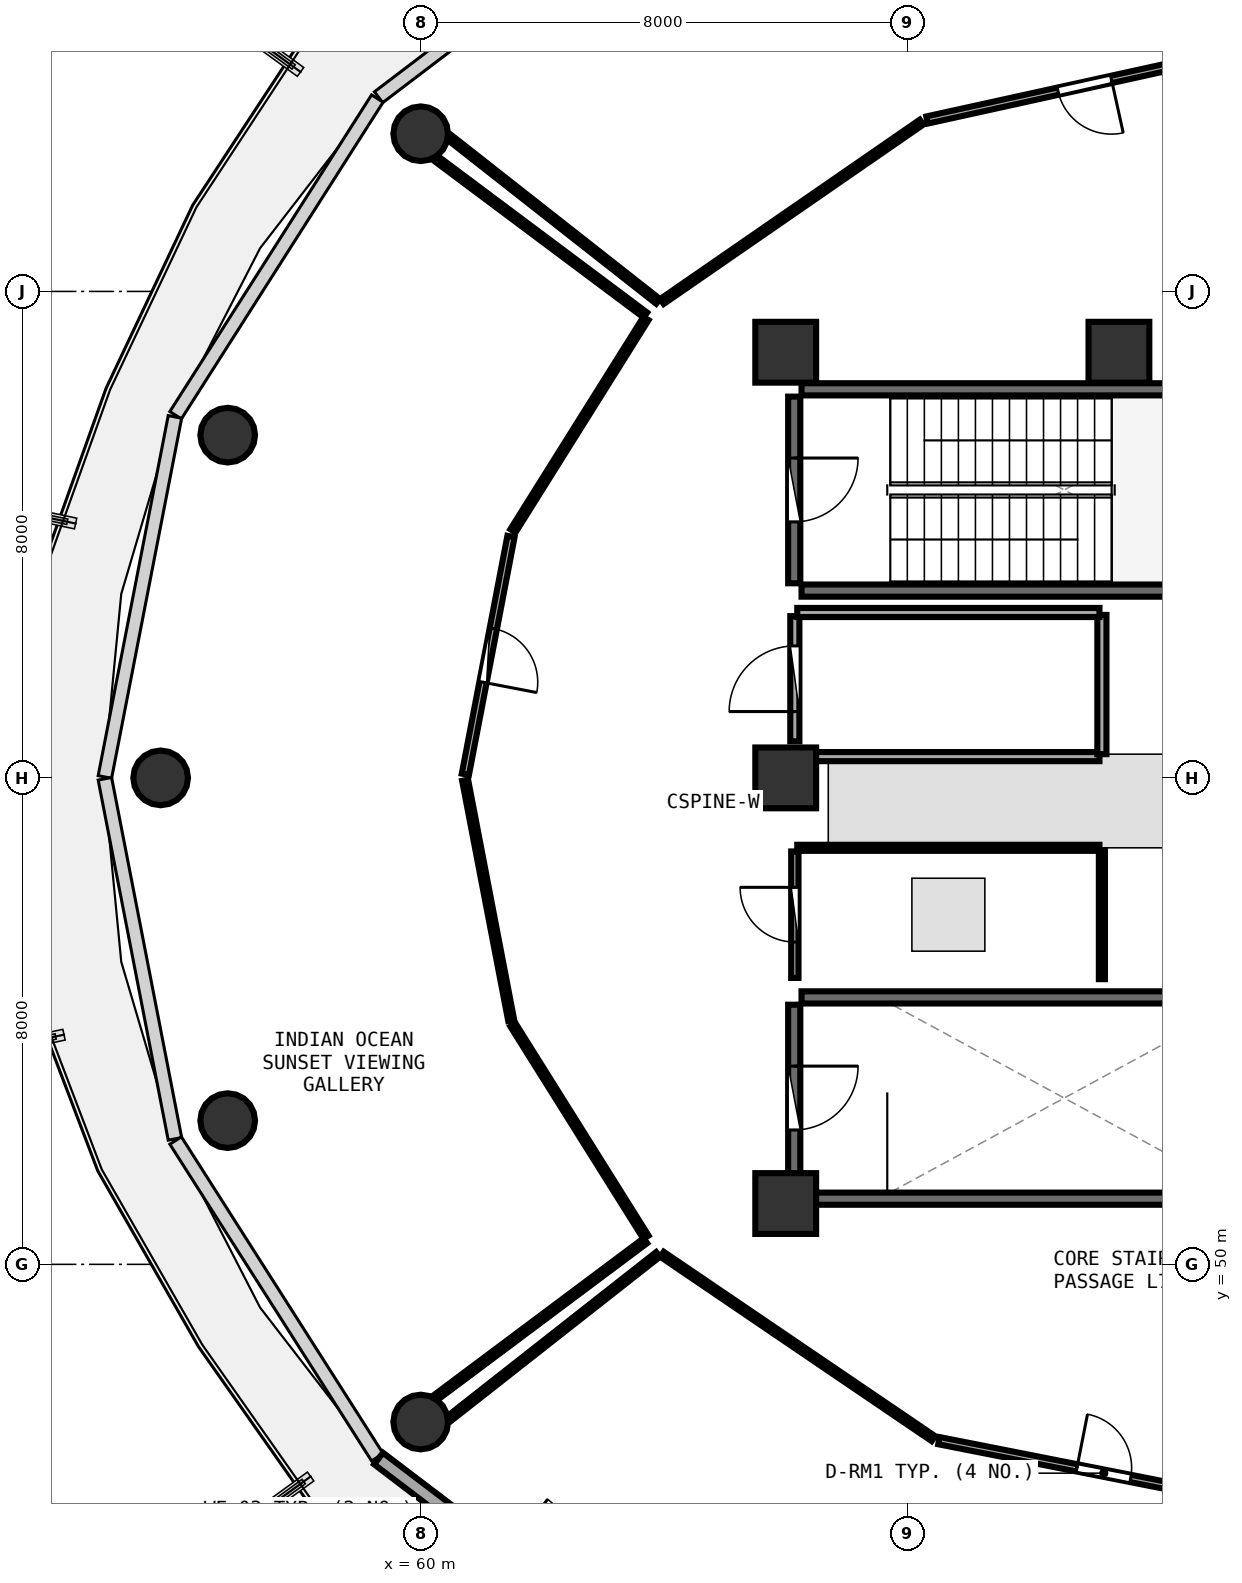
"""IFC4 building model, lengths in metres.
Left out: names, types, materials, properties, quantities, classifications, styles, units other than length and angle.
Written with IfcOpenShell. Run it as: python <this file> out.ifc"""

import sys

from ifc_helpers import new_model, si_unit, direction, frame, frame_2d, origin, origin_2d, place, context, subcontext, project, spatial, rectangle, circle, extrude, element, fill, save


model = new_model("IFC4")
c1 = context("Model", 3, precision=1e-05, world=origin(), true_north=direction((0.0, 1.0)))
c2 = subcontext(c1, "Body", "Model", "MODEL_VIEW")
j1 = project(units=[si_unit("LENGTHUNIT", "METRE"), si_unit("PLANEANGLEUNIT", "RADIAN")], contexts=[c1])
p1 = place(None, origin())
s1 = spatial("IfcSite", under=j1, at=p1, CompositionType="ELEMENT")
p2 = place(p1, origin())
s2 = spatial("IfcBuilding", under=s1, at=p2, CompositionType="ELEMENT")
p3 = place(p2, frame((0.0, 0.0, 293.7)))
s3 = spatial("IfcBuildingStorey", under=s2, at=p3, CompositionType="ELEMENT", Elevation=293.7)
for number, where, z_axis, x_axis in (
    (1, (66.0, 51.0, 0.0), (0.0, 0.0, 1.0), (1.0, 0.0, 0.0)),
    (2, (71.48, 65.0, 0.0), (0.0, 0.0, 1.0), (1.0, 0.0, 0.0)),
    (3, (66.0, 65.0, 0.0), (0.0, 0.0, 1.0), (1.0, 0.0, 0.0)),
    (4, (66.0, 58.0, 0.0), (0.0, 0.0, 1.0), (1.0, 0.0, 0.0)),
):
    element("IfcColumn", number, at=place(p3, frame(where, z_axis=z_axis, x_axis=x_axis)), inside=s3, PredefinedType="PILASTER", context=c2, shape_type="SweptSolid", body=[
        extrude(rectangle(XDim=1.0, YDim=1.0, at=origin_2d()), origin(), (0.0, 0.0, 1.0), 4.8),
    ])
for number, where, z_axis, x_axis in (
    (5, (59.997, 68.593, 0.0), (0.0, 0.0, 1.0), (1.0, 0.0, 0.0)),
    (6, (56.823, 63.636, 0.0), (0.0, 0.0, 1.0), (1.0, 0.0, 0.0)),
    (7, (55.72, 58.0, 0.0), (0.0, 0.0, 1.0), (1.0, 0.0, 0.0)),
    (8, (56.823, 52.364, 0.0), (0.0, 0.0, 1.0), (1.0, 0.0, 0.0)),
    (9, (59.997, 47.407, 0.0), (0.0, 0.0, 1.0), (1.0, 0.0, 0.0)),
):
    element("IfcColumn", number, at=place(p3, frame(where, z_axis=z_axis, x_axis=x_axis)), inside=s3, PredefinedType="COLUMN", context=c2, shape_type="SweptSolid", body=[
        extrude(circle(Radius=0.45, at=origin_2d()), origin(), (0.0, 0.0, 1.0), 4.8),
    ])
p4 = place(p3, frame((59.304, 46.806, 0.0), z_axis=(0.0, 0.0, 1.0), x_axis=(0.796010444211, -0.605282886514, 0.0)))
e10 = element("IfcWall", 10, at=p4, inside=s3, PredefinedType="SOLIDWALL", context=c2, shape_type="SweptSolid", body=[
    extrude(rectangle(XDim=6.387, YDim=0.24, at=frame_2d((3.194, 0.0))), origin(), (0.0, 0.0, 1.0), 4.525),
])
p5 = place(p4, frame((2.619, 0.0, 0.0)))
e11 = element("IfcOpeningElement", 11, at=p5, cuts=e10, PredefinedType="OPENING", context=c2, shape_type="SweptSolid", body=[
    extrude(rectangle(XDim=1.15, YDim=2.15, at=frame_2d((0.575, 1.075))), frame((0.0, 0.13, 0.0), z_axis=(0.0, -1.0, 0.0), x_axis=(1.0, 0.0, 0.0)), (0.0, 0.0, 1.0), 0.26),
])
for number, where, z_axis, x_axis in (
    (12, (66.26, 61.08, 0.0), (0.0, 0.0, 1.0), (1.0, 0.0, 0.0)),
    (13, (73.42, 64.39, 0.0), (0.0, 0.0, 1.0), (-1.0, 0.0, 0.0)),
):
    element("IfcWall", number, at=place(p3, frame(where, z_axis=z_axis, x_axis=x_axis)), inside=s3, PredefinedType="SHEAR", context=c2, shape_type="SweptSolid", body=[
        extrude(rectangle(XDim=7.16, YDim=0.2, at=frame_2d((3.58, 0.0))), origin(), (0.0, 0.0, 1.0), 4.54),
    ])
p6 = place(p3, frame((66.14, 64.27, 0.0), z_axis=(0.0, 0.0, 1.0), x_axis=(0.0, -1.0, 0.0)))
e14 = element("IfcWall", 14, at=p6, inside=s3, PredefinedType="SHEAR", context=c2, shape_type="SweptSolid", body=[
    extrude(rectangle(XDim=3.07, YDim=0.2, at=frame_2d((1.535, 0.0))), origin(), (0.0, 0.0, 1.0), 4.54),
])
p7 = place(p6, frame((1.01, 0.0, 0.0)))
e15 = element("IfcOpeningElement", 15, at=p7, cuts=e14, PredefinedType="OPENING", context=c2, shape_type="SweptSolid", body=[
    extrude(rectangle(XDim=1.05, YDim=2.1, at=frame_2d((0.525, 1.05))), frame((0.0, 0.11, 0.0), z_axis=(0.0, -1.0, 0.0), x_axis=(1.0, 0.0, 0.0)), (0.0, 0.0, 1.0), 0.22),
])
for number, where, z_axis, x_axis in (
    (16, (66.26, 51.08, 0.0), (0.0, 0.0, 1.0), (1.0, 0.0, 0.0)),
    (17, (73.42, 54.39, 0.0), (0.0, 0.0, 1.0), (-1.0, 0.0, 0.0)),
):
    element("IfcWall", number, at=place(p3, frame(where, z_axis=z_axis, x_axis=x_axis)), inside=s3, PredefinedType="SHEAR", context=c2, shape_type="SweptSolid", body=[
        extrude(rectangle(XDim=7.16, YDim=0.2, at=frame_2d((3.58, 0.0))), origin(), (0.0, 0.0, 1.0), 4.54),
    ])
p8 = place(p3, frame((66.14, 54.27, 0.0), z_axis=(0.0, 0.0, 1.0), x_axis=(0.0, -1.0, 0.0)))
e18 = element("IfcWall", 18, at=p8, inside=s3, PredefinedType="SHEAR", context=c2, shape_type="SweptSolid", body=[
    extrude(rectangle(XDim=3.07, YDim=0.2, at=frame_2d((1.535, 0.0))), origin(), (0.0, 0.0, 1.0), 4.54),
])
p9 = place(p8, frame((1.01, 0.0, 0.0)))
e19 = element("IfcOpeningElement", 19, at=p9, cuts=e18, PredefinedType="OPENING", context=c2, shape_type="SweptSolid", body=[
    extrude(rectangle(XDim=1.05, YDim=2.1, at=frame_2d((0.525, 1.05))), frame((0.0, 0.11, 0.0), z_axis=(0.0, -1.0, 0.0), x_axis=(1.0, 0.0, 0.0)), (0.0, 0.0, 1.0), 0.22),
])
p10 = place(p3, frame((66.15, 58.602, 0.0), z_axis=(0.0, 0.0, 1.0), x_axis=(0.0, 1.0, 0.0)))
e20 = element("IfcWall", 20, at=p10, inside=s3, PredefinedType="PARTITIONING", context=c2, shape_type="SweptSolid", body=[
    extrude(rectangle(XDim=2.058, YDim=0.15, at=frame_2d((1.029, 0.0))), origin(), (0.0, 0.0, 1.0), 3.825),
])
p11 = place(p10, frame((0.489, 0.0, 0.0)))
e21 = element("IfcOpeningElement", 21, at=p11, cuts=e20, PredefinedType="OPENING", context=c2, shape_type="SweptSolid", body=[
    extrude(rectangle(XDim=1.08, YDim=2.1, at=frame_2d((0.54, 1.05))), frame((0.0, 0.085, 0.0), z_axis=(0.0, -1.0, 0.0), x_axis=(1.0, 0.0, 0.0)), (0.0, 0.0, 1.0), 0.17),
])
p12 = place(p3, frame((66.15, 54.71, 0.0), z_axis=(0.0, 0.0, 1.0), x_axis=(0.0, 1.0, 0.0)))
e22 = element("IfcWall", 22, at=p12, inside=s3, PredefinedType="PARTITIONING", context=c2, shape_type="SweptSolid", body=[
    extrude(rectangle(XDim=2.08, YDim=0.12, at=frame_2d((1.04, 0.0))), origin(), (0.0, 0.0, 1.0), 3.825),
])
p13 = place(p12, frame((0.59, 0.0, 0.0)))
e23 = element("IfcOpeningElement", 23, at=p13, cuts=e22, PredefinedType="OPENING", context=c2, shape_type="SweptSolid", body=[
    extrude(rectangle(XDim=0.9, YDim=2.08, at=frame_2d((0.45, 1.04))), frame((0.0, 0.07, 0.0), z_axis=(0.0, -1.0, 0.0), x_axis=(1.0, 0.0, 0.0)), (0.0, 0.0, 1.0), 0.14),
])
p14 = place(p3, frame((73.51, 69.961, 0.0), z_axis=(0.0, 0.0, 1.0), x_axis=(-0.976586737222, -0.215124021631, 0.0)))
e24 = element("IfcWall", 24, at=p14, inside=s3, PredefinedType="PARTITIONING", context=c2, shape_type="SweptSolid", body=[
    extrude(rectangle(XDim=5.31, YDim=0.12, at=frame_2d((2.655, 0.0))), origin(), (0.0, 0.0, 1.0), 2.525),
])
p15 = place(p14, frame((2.205, 0.0, 0.0)))
e25 = element("IfcOpeningElement", 25, at=p15, cuts=e24, PredefinedType="OPENING", context=c2, shape_type="SweptSolid", body=[
    extrude(rectangle(XDim=0.9, YDim=2.08, at=frame_2d((0.45, 1.04))), frame((0.0, 0.07, 0.0), z_axis=(0.0, -1.0, 0.0), x_axis=(1.0, 0.0, 0.0)), (0.0, 0.0, 1.0), 0.14),
])
p16 = place(p3, frame((61.482, 61.97, 0.0), z_axis=(0.0, 0.0, 1.0), x_axis=(-0.18843585457, -0.982085499696, 0.0)))
e26 = element("IfcWall", 26, at=p16, inside=s3, PredefinedType="PARTITIONING", context=c2, shape_type="SweptSolid", body=[
    extrude(rectangle(XDim=3.983, YDim=0.12, at=frame_2d((1.991, 0.0))), origin(), (0.0, 0.0, 1.0), 2.525),
])
p17 = place(p16, frame((1.541, 0.0, 0.0)))
e27 = element("IfcOpeningElement", 27, at=p17, cuts=e26, PredefinedType="OPENING", context=c2, shape_type="SweptSolid", body=[
    extrude(rectangle(XDim=0.9, YDim=2.08, at=frame_2d((0.45, 1.04))), frame((0.0, 0.07, 0.0), z_axis=(0.0, -1.0, 0.0), x_axis=(1.0, 0.0, 0.0)), (0.0, 0.0, 1.0), 0.14),
])
p18 = place(p3, frame((68.52, 47.1, 0.0), z_axis=(0.0, 0.0, 1.0), x_axis=(0.981112332552, -0.193438855749, 0.0)))
e28 = element("IfcWall", 28, at=p18, inside=s3, PredefinedType="PARTITIONING", context=c2, shape_type="SweptSolid", body=[
    extrude(rectangle(XDim=5.525, YDim=0.12, at=frame_2d((2.763, 0.0))), origin(), (0.0, 0.0, 1.0), 2.525),
])
p19 = place(p18, frame((2.313, 0.0, 0.0)))
e29 = element("IfcOpeningElement", 29, at=p19, cuts=e28, PredefinedType="OPENING", context=c2, shape_type="SweptSolid", body=[
    extrude(rectangle(XDim=0.9, YDim=2.08, at=frame_2d((0.45, 1.04))), frame((0.0, 0.07, 0.0), z_axis=(0.0, -1.0, 0.0), x_axis=(1.0, 0.0, 0.0)), (0.0, 0.0, 1.0), 0.14),
])
p20 = place(p3, frame((66.391, 58.35, 0.0), z_axis=(0.0, 0.0, 1.0), x_axis=(1.0, 0.0, 0.0)))
e30 = element("IfcWall", 30, at=p20, inside=s3, PredefinedType="PARTITIONING", context=c2, shape_type="SweptSolid", body=[
    extrude(rectangle(XDim=4.769, YDim=0.15, at=frame_2d((2.384, 0.0))), origin(), (0.0, 0.0, 1.0), 4.53),
])
p21 = place(p3, frame((71.2, 58.39, 0.0), z_axis=(0.0, 0.0, 1.0), x_axis=(0.0, 1.0, 0.0)))
e31 = element("IfcWall", 31, at=p21, inside=s3, PredefinedType="PARTITIONING", context=c2, shape_type="SweptSolid", body=[
    extrude(rectangle(XDim=2.29, YDim=0.15, at=frame_2d((1.145, 0.0))), origin(), (0.0, 0.0, 1.0), 4.53),
])
p22 = place(p3, frame((71.16, 60.72, 0.0), z_axis=(0.0, 0.0, 1.0), x_axis=(-1.0, 0.0, 0.0)))
e32 = element("IfcWall", 32, at=p22, inside=s3, PredefinedType="PARTITIONING", context=c2, shape_type="SweptSolid", body=[
    extrude(rectangle(XDim=4.97, YDim=0.15, at=frame_2d((2.485, 0.0))), origin(), (0.0, 0.0, 1.0), 3.825),
])
p23 = place(p3, frame((71.2, 54.69, 0.0), z_axis=(0.0, 0.0, 1.0), x_axis=(0.0, 1.0, 0.0)))
e33 = element("IfcWall", 33, at=p23, inside=s3, PredefinedType="PARTITIONING", context=c2, shape_type="SweptSolid", body=[
    extrude(rectangle(XDim=2.12, YDim=0.1, at=frame_2d((1.06, 0.0))), origin(), (0.0, 0.0, 1.0), 4.53),
])
p24 = place(p3, frame((71.16, 56.85, 0.0), z_axis=(0.0, 0.0, 1.0), x_axis=(-1.0, 0.0, 0.0)))
e34 = element("IfcWall", 34, at=p24, inside=s3, PredefinedType="PARTITIONING", context=c2, shape_type="SweptSolid", body=[
    extrude(rectangle(XDim=4.97, YDim=0.1, at=frame_2d((2.485, 0.0))), origin(), (0.0, 0.0, 1.0), 3.825),
])
p25 = place(p3, frame((68.233, 68.783, 0.0), z_axis=(0.0, 0.0, 1.0), x_axis=(-0.822777954932, -0.568362944673, 0.0)))
e35 = element("IfcWall", 35, at=p25, inside=s3, PredefinedType="PARTITIONING", context=c2, shape_type="SweptSolid", body=[
    extrude(rectangle(XDim=5.188, YDim=0.1, at=frame_2d((2.594, 0.0))), origin(), (0.0, 0.0, 1.0), 2.525),
])
p26 = place(p3, frame((63.9, 65.837, 0.0), z_axis=(0.0, 0.0, 1.0), x_axis=(-0.786300871832, 0.617843782, 0.0)))
e36 = element("IfcWall", 36, at=p26, inside=s3, PredefinedType="PARTITIONING", context=c2, shape_type="SweptSolid", body=[
    extrude(rectangle(XDim=4.365, YDim=0.1, at=frame_2d((2.183, 0.0))), origin(), (0.0, 0.0, 1.0), 2.525),
])
p27 = place(p3, frame((63.702, 65.554, 0.0), z_axis=(0.0, 0.0, 1.0), x_axis=(-0.53099994336, -0.847371854708, 0.0)))
e37 = element("IfcWall", 37, at=p27, inside=s3, PredefinedType="PARTITIONING", context=c2, shape_type="SweptSolid", body=[
    extrude(rectangle(XDim=4.12, YDim=0.1, at=frame_2d((2.06, 0.0))), origin(), (0.0, 0.0, 1.0), 2.525),
])
p28 = place(p3, frame((60.728, 57.961, 0.0), z_axis=(0.0, 0.0, 1.0), x_axis=(0.188453433241, -0.982082126657, 0.0)))
e38 = element("IfcWall", 38, at=p28, inside=s3, PredefinedType="PARTITIONING", context=c2, shape_type="SweptSolid", body=[
    extrude(rectangle(XDim=4.022, YDim=0.1, at=frame_2d((2.011, 0.0))), origin(), (0.0, 0.0, 1.0), 2.525),
])
p29 = place(p3, frame((61.514, 53.937, 0.0), z_axis=(0.0, 0.0, 1.0), x_axis=(0.53099994336, -0.847371854708, 0.0)))
e39 = element("IfcWall", 39, at=p29, inside=s3, PredefinedType="PARTITIONING", context=c2, shape_type="SweptSolid", body=[
    extrude(rectangle(XDim=4.12, YDim=0.1, at=frame_2d((2.06, 0.0))), origin(), (0.0, 0.0, 1.0), 2.525),
])
for number, where, z_axis, x_axis in (
    (40, (63.691, 50.388, 0.0), (0.0, 0.0, 1.0), (-0.801, -0.599, 0.0)),
    (41, (60.245, 68.188, 0.0), (0.0, 0.0, 1.0), (0.801, -0.599, 0.0)),
):
    element("IfcWall", number, at=place(p3, frame(where, z_axis=z_axis, x_axis=x_axis)), inside=s3, PredefinedType="PARTITIONING", context=c2, shape_type="SweptSolid", body=[
        extrude(rectangle(XDim=4.302, YDim=0.1, at=frame_2d((2.151, 0.0))), origin(), (0.0, 0.0, 1.0), 2.525),
    ])
p30 = place(p3, frame((63.965, 50.166, 0.0), z_axis=(0.0, 0.0, 1.0), x_axis=(0.82725042388, -0.561833370485, 0.0)))
e42 = element("IfcWall", 42, at=p30, inside=s3, PredefinedType="PARTITIONING", context=c2, shape_type="SweptSolid", body=[
    extrude(rectangle(XDim=5.395, YDim=0.1, at=frame_2d((2.697, 0.0))), origin(), (0.0, 0.0, 1.0), 2.525),
])
p31 = place(p3, frame((60.468, 47.466, 0.0), z_axis=(0.0, 0.0, 1.0), x_axis=(0.786300871832, 0.617843782, 0.0)))
e43 = element("IfcWall", 43, at=p31, inside=s3, PredefinedType="PARTITIONING", context=c2, shape_type="SweptSolid", body=[
    extrude(rectangle(XDim=4.365, YDim=0.1, at=frame_2d((2.183, 0.0))), origin(), (0.0, 0.0, 1.0), 2.525),
])
p32 = place(p7, origin())
e44 = element("IfcDoor", 44, at=p32, inside=s3, OperationType="SINGLE_SWING_LEFT", PredefinedType="DOOR", context=c2, shape_type="SweptSolid", body=[
    extrude(rectangle(XDim=1.05, YDim=2.1, at=frame_2d((0.525, 1.05))), frame((0.0, 0.025, 0.0), z_axis=(0.0, -1.0, 0.0), x_axis=(1.0, 0.0, 0.0)), (0.0, 0.0, 1.0), 0.05),
])
fill(e15, e44)
p33 = place(p9, origin())
e45 = element("IfcDoor", 45, at=p33, inside=s3, OperationType="SINGLE_SWING_LEFT", PredefinedType="DOOR", context=c2, shape_type="SweptSolid", body=[
    extrude(rectangle(XDim=1.05, YDim=2.1, at=frame_2d((0.525, 1.05))), frame((0.0, 0.025, 0.0), z_axis=(0.0, -1.0, 0.0), x_axis=(1.0, 0.0, 0.0)), (0.0, 0.0, 1.0), 0.05),
])
fill(e19, e45)
p34 = place(p11, origin())
e46 = element("IfcDoor", 46, at=p34, inside=s3, OperationType="SINGLE_SWING_LEFT", PredefinedType="DOOR", context=c2, shape_type="SweptSolid", body=[
    extrude(rectangle(XDim=1.08, YDim=2.1, at=frame_2d((0.54, 1.05))), frame((0.0, 0.025, 0.0), z_axis=(0.0, -1.0, 0.0), x_axis=(1.0, 0.0, 0.0)), (0.0, 0.0, 1.0), 0.05),
])
fill(e21, e46)
p35 = place(p13, origin())
e47 = element("IfcDoor", 47, at=p35, inside=s3, OperationType="SINGLE_SWING_RIGHT", PredefinedType="DOOR", context=c2, shape_type="SweptSolid", body=[
    extrude(rectangle(XDim=0.9, YDim=2.08, at=frame_2d((0.45, 1.04))), frame((0.0, 0.025, 0.0), z_axis=(0.0, -1.0, 0.0), x_axis=(1.0, 0.0, 0.0)), (0.0, 0.0, 1.0), 0.05),
])
fill(e23, e47)
p36 = place(p15, origin())
e48 = element("IfcDoor", 48, at=p36, inside=s3, OperationType="SINGLE_SWING_LEFT", PredefinedType="DOOR", context=c2, shape_type="SweptSolid", body=[
    extrude(rectangle(XDim=0.9, YDim=2.08, at=frame_2d((0.45, 1.04))), frame((0.0, 0.025, 0.0), z_axis=(0.0, -1.0, 0.0), x_axis=(1.0, 0.0, 0.0)), (0.0, 0.0, 1.0), 0.05),
])
fill(e25, e48)
p37 = place(p17, origin())
e49 = element("IfcDoor", 49, at=p37, inside=s3, OperationType="SINGLE_SWING_RIGHT", PredefinedType="DOOR", context=c2, shape_type="SweptSolid", body=[
    extrude(rectangle(XDim=0.9, YDim=2.08, at=frame_2d((0.45, 1.04))), frame((0.0, 0.025, 0.0), z_axis=(0.0, -1.0, 0.0), x_axis=(1.0, 0.0, 0.0)), (0.0, 0.0, 1.0), 0.05),
])
fill(e27, e49)
p38 = place(p19, origin())
e50 = element("IfcDoor", 50, at=p38, inside=s3, OperationType="SINGLE_SWING_LEFT", PredefinedType="DOOR", context=c2, shape_type="SweptSolid", body=[
    extrude(rectangle(XDim=0.9, YDim=2.08, at=frame_2d((0.45, 1.04))), frame((0.0, 0.025, 0.0), z_axis=(0.0, -1.0, 0.0), x_axis=(1.0, 0.0, 0.0)), (0.0, 0.0, 1.0), 0.05),
])
fill(e29, e50)
save(model, sys.argv[1])
